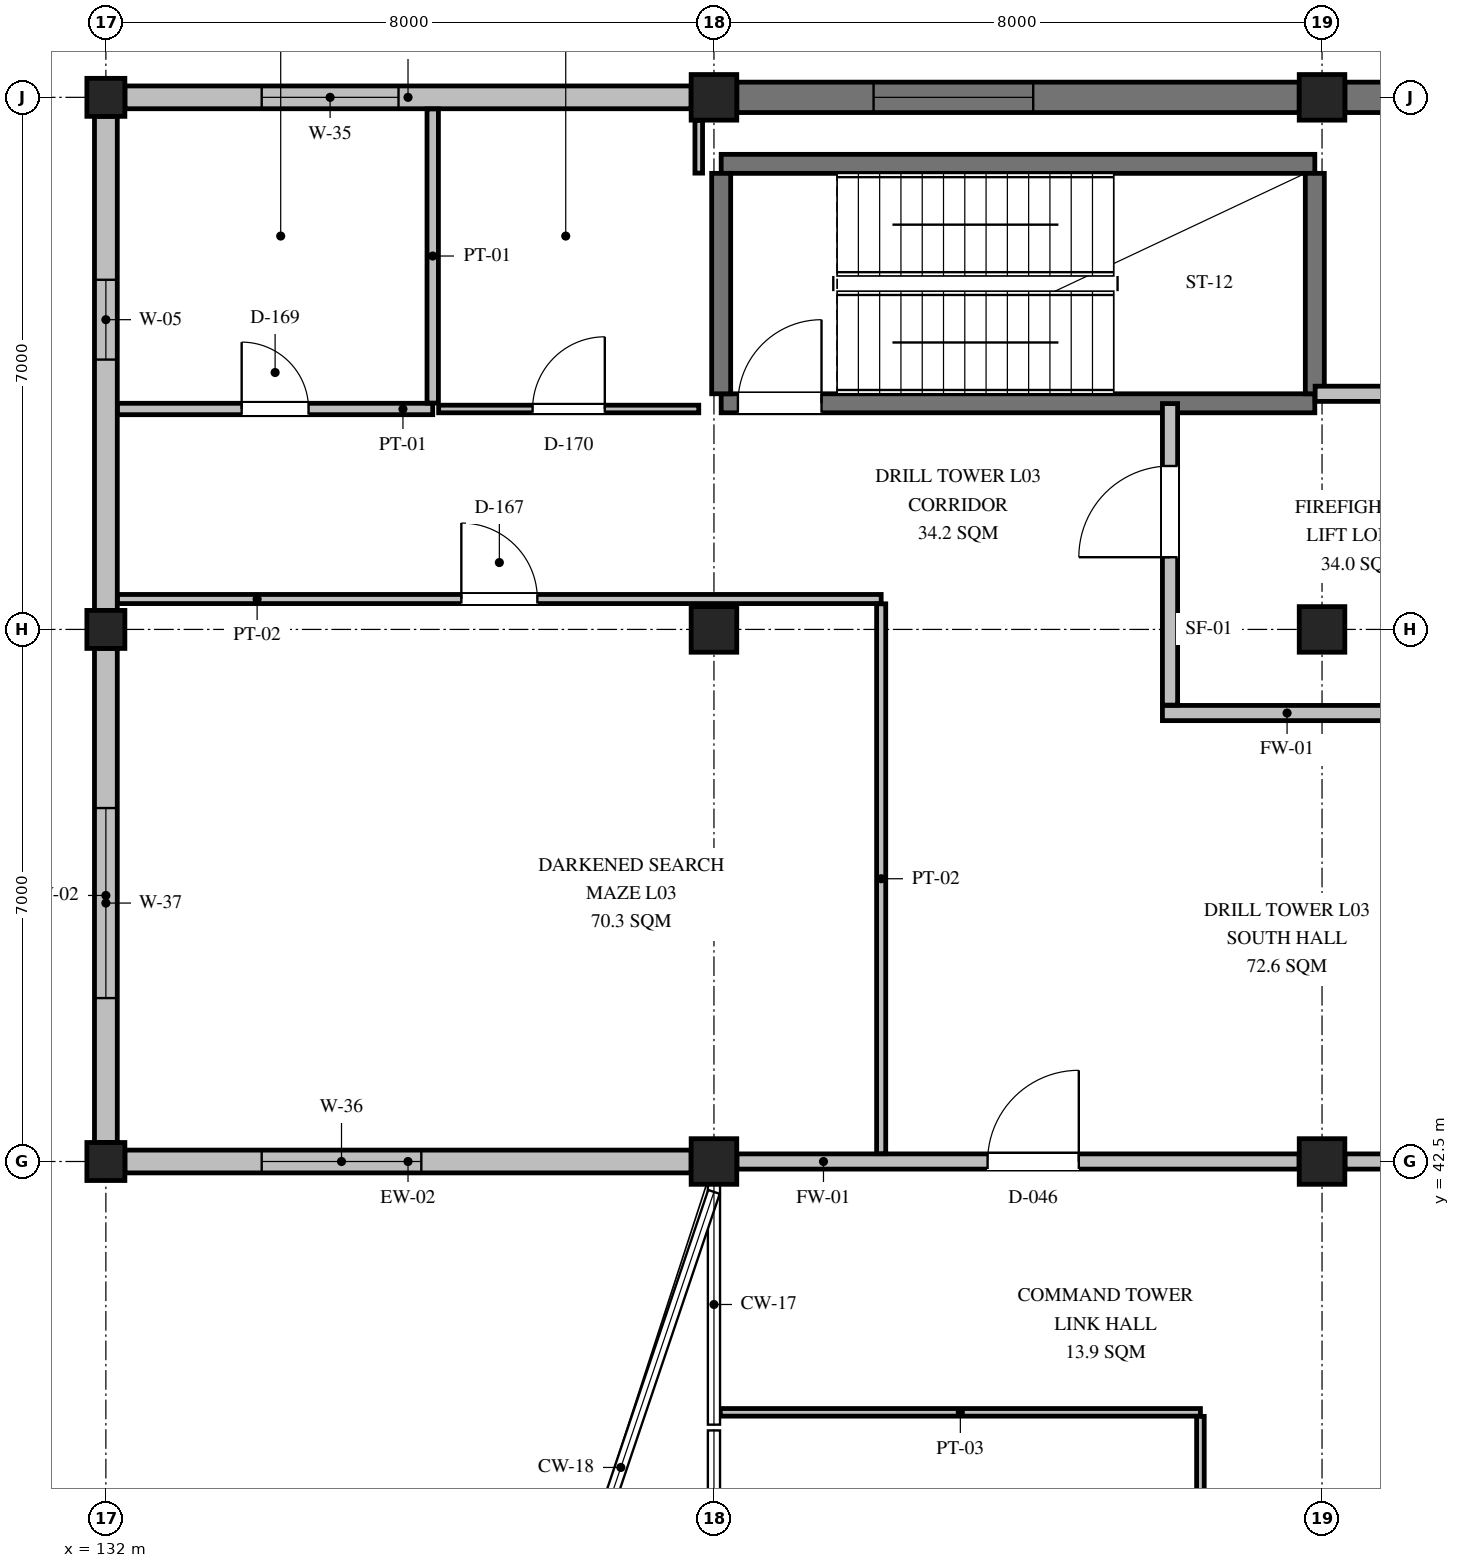
"""IFC4 building model, lengths in metres.
Left out: names, types, materials, properties, quantities, classifications, styles, units other than length and angle.
Written with IfcOpenShell. Run it as: python <this file> out.ifc"""

import sys

from ifc_helpers import new_model, si_unit, direction, frame, frame_2d, origin, origin_2d, place, context, subcontext, project, spatial, rectangle, extrude, element, fill, save


model = new_model("IFC4")
c1 = context("Model", 3, precision=1e-05, world=origin(), true_north=direction((0.0, 1.0)))
c2 = subcontext(c1, "Body", "Model", "MODEL_VIEW")
j1 = project(units=[si_unit("LENGTHUNIT", "METRE"), si_unit("PLANEANGLEUNIT", "RADIAN")], contexts=[c1])
p1 = place(None, origin())
s1 = spatial("IfcSite", under=j1, at=p1, CompositionType="ELEMENT")
p2 = place(p1, origin())
s2 = spatial("IfcBuilding", under=s1, at=p2, CompositionType="ELEMENT")
p3 = place(p2, frame((0.0, 0.0, 10.05)))
s3 = spatial("IfcBuildingStorey", under=s2, at=p3, CompositionType="ELEMENT", Elevation=10.05)
for number, where, z_axis, x_axis in (
    (1, (132.0, 42.5, 0.0), (0.0, 0.0, 1.0), (1.0, 0.0, 0.0)),
    (2, (132.0, 49.5, 0.0), (0.0, 0.0, 1.0), (1.0, 0.0, 0.0)),
    (3, (132.0, 56.5, 0.0), (0.0, 0.0, 1.0), (1.0, 0.0, 0.0)),
):
    element("IfcColumn", number, at=place(p3, frame(where, z_axis=z_axis, x_axis=x_axis)), inside=s3, PredefinedType="COLUMN", context=c2, shape_type="SweptSolid", body=[
        extrude(rectangle(XDim=0.5, YDim=0.5, at=origin_2d()), origin(), (0.0, 0.0, 1.0), 4.2),
    ])
for number, where, z_axis, x_axis in (
    (4, (140.0, 42.5, 0.0), (0.0, 0.0, 1.0), (1.0, 0.0, 0.0)),
    (5, (140.0, 49.5, 0.0), (0.0, 0.0, 1.0), (1.0, 0.0, 0.0)),
    (6, (140.0, 56.5, 0.0), (0.0, 0.0, 1.0), (1.0, 0.0, 0.0)),
    (7, (148.0, 42.5, 0.0), (0.0, 0.0, 1.0), (1.0, 0.0, 0.0)),
    (8, (148.0, 49.5, 0.0), (0.0, 0.0, 1.0), (1.0, 0.0, 0.0)),
    (9, (148.0, 56.5, 0.0), (0.0, 0.0, 1.0), (1.0, 0.0, 0.0)),
):
    element("IfcColumn", number, at=place(p3, frame(where, z_axis=z_axis, x_axis=x_axis)), inside=s3, PredefinedType="COLUMN", context=c2, shape_type="SweptSolid", body=[
        extrude(rectangle(XDim=0.6, YDim=0.6, at=origin_2d()), origin(), (0.0, 0.0, 1.0), 4.2),
    ])
p4 = place(p3, frame((132.25, 56.5, 0.0), z_axis=(0.0, 0.0, 1.0), x_axis=(1.0, 0.0, 0.0)))
e10 = element("IfcWall", 10, at=p4, inside=s3, PredefinedType="SOLIDWALL", context=c2, shape_type="SweptSolid", body=[
    extrude(rectangle(XDim=7.45, YDim=0.3, at=frame_2d((3.725, 0.0))), origin(), (0.0, 0.0, 1.0), 3.444),
])
p5 = place(p4, frame((1.8, 0.0, 0.9)))
e11 = element("IfcOpeningElement", 11, at=p5, cuts=e10, PredefinedType="OPENING", context=c2, shape_type="SweptSolid", body=[
    extrude(rectangle(XDim=1.8, YDim=2.1, at=frame_2d((0.9, 1.05))), frame((0.0, 0.16, 0.0), z_axis=(0.0, -1.0, 0.0), x_axis=(1.0, 0.0, 0.0)), (0.0, 0.0, 1.0), 0.32),
])
p6 = place(p3, frame((140.3, 56.5, 0.0), z_axis=(0.0, 0.0, 1.0), x_axis=(1.0, 0.0, 0.0)))
e12 = element("IfcWall", 12, at=p6, inside=s3, PredefinedType="SHEAR", context=c2, shape_type="SweptSolid", body=[
    extrude(rectangle(XDim=7.4, YDim=0.4, at=frame_2d((3.7, 0.0))), origin(), (0.0, 0.0, 1.0), 4.0),
])
p7 = place(p6, frame((1.8, 0.0, 0.9)))
e13 = element("IfcOpeningElement", 13, at=p7, cuts=e12, PredefinedType="OPENING", context=c2, shape_type="SweptSolid", body=[
    extrude(rectangle(XDim=2.1, YDim=2.1, at=frame_2d((1.05, 1.05))), frame((0.0, 0.21, 0.0), z_axis=(0.0, -1.0, 0.0), x_axis=(1.0, 0.0, 0.0)), (0.0, 0.0, 1.0), 0.42),
])
p8 = place(p3, frame((148.3, 56.5, 0.0), z_axis=(0.0, 0.0, 1.0), x_axis=(1.0, 0.0, 0.0)))
e14 = element("IfcWall", 14, at=p8, inside=s3, PredefinedType="SHEAR", context=c2, shape_type="SweptSolid", body=[
    extrude(rectangle(XDim=12.4, YDim=0.4, at=frame_2d((6.2, 0.0))), origin(), (0.0, 0.0, 1.0), 4.0),
])
p9 = place(p8, frame((1.8, 0.0, 0.9)))
e15 = element("IfcOpeningElement", 15, at=p9, cuts=e14, PredefinedType="OPENING", context=c2, shape_type="SweptSolid", body=[
    extrude(rectangle(XDim=2.5, YDim=2.1, at=frame_2d((1.25, 1.05))), frame((0.0, 0.21, 0.0), z_axis=(0.0, -1.0, 0.0), x_axis=(1.0, 0.0, 0.0)), (0.0, 0.0, 1.0), 0.42),
])
p10 = place(p3, frame((132.0, 42.75, 0.0), z_axis=(0.0, 0.0, 1.0), x_axis=(0.0, 1.0, 0.0)))
e16 = element("IfcWall", 16, at=p10, inside=s3, PredefinedType="SOLIDWALL", context=c2, shape_type="SweptSolid", body=[
    extrude(rectangle(XDim=6.5, YDim=0.3, at=frame_2d((3.25, 0.0))), origin(), (0.0, 0.0, 1.0), 3.494),
])
p11 = place(p10, frame((1.9, 0.0, 0.85)))
e17 = element("IfcOpeningElement", 17, at=p11, cuts=e16, PredefinedType="OPENING", context=c2, shape_type="SweptSolid", body=[
    extrude(rectangle(XDim=2.5, YDim=2.1, at=frame_2d((1.25, 1.05))), frame((0.0, 0.16, 0.0), z_axis=(0.0, -1.0, 0.0), x_axis=(1.0, 0.0, 0.0)), (0.0, 0.0, 1.0), 0.32),
])
p12 = place(p3, frame((132.0, 49.75, 0.0), z_axis=(0.0, 0.0, 1.0), x_axis=(0.0, 1.0, 0.0)))
e18 = element("IfcWall", 18, at=p12, inside=s3, PredefinedType="SOLIDWALL", context=c2, shape_type="SweptSolid", body=[
    extrude(rectangle(XDim=6.5, YDim=0.3, at=frame_2d((3.25, 0.0))), origin(), (0.0, 0.0, 1.0), 3.544),
])
p13 = place(p12, frame((3.3, 0.0, 1.05)))
e19 = element("IfcOpeningElement", 19, at=p13, cuts=e18, PredefinedType="OPENING", context=c2, shape_type="SweptSolid", body=[
    extrude(rectangle(XDim=1.05, YDim=1.05, at=frame_2d((0.525, 0.525))), frame((0.0, 0.16, 0.0), z_axis=(0.0, -1.0, 0.0), x_axis=(1.0, 0.0, 0.0)), (0.0, 0.0, 1.0), 0.32),
])
p14 = place(p3, frame((132.25, 42.5, 0.0), z_axis=(0.0, 0.0, 1.0), x_axis=(1.0, 0.0, 0.0)))
e20 = element("IfcWall", 20, at=p14, inside=s3, PredefinedType="SOLIDWALL", context=c2, shape_type="SweptSolid", body=[
    extrude(rectangle(XDim=7.45, YDim=0.3, at=frame_2d((3.725, 0.0))), origin(), (0.0, 0.0, 1.0), 3.544),
])
p15 = place(p14, frame((1.8, 0.0, 0.9)))
e21 = element("IfcOpeningElement", 21, at=p15, cuts=e20, PredefinedType="OPENING", context=c2, shape_type="SweptSolid", body=[
    extrude(rectangle(XDim=2.1, YDim=2.1, at=frame_2d((1.05, 1.05))), frame((0.0, 0.16, 0.0), z_axis=(0.0, -1.0, 0.0), x_axis=(1.0, 0.0, 0.0)), (0.0, 0.0, 1.0), 0.32),
])
p16 = place(p3, frame((140.095, 52.475, 0.0), z_axis=(0.0, 0.0, 1.0), x_axis=(1.0, 0.0, 0.0)))
e22 = element("IfcWall", 22, at=p16, inside=s3, PredefinedType="SHEAR", context=c2, shape_type="SweptSolid", body=[
    extrude(rectangle(XDim=7.81, YDim=0.25, at=frame_2d((3.905, 0.0))), origin(), (0.0, 0.0, 1.0), 4.0),
])
p17 = place(p16, frame((0.22, 0.0, 0.0)))
e23 = element("IfcOpeningElement", 23, at=p17, cuts=e22, PredefinedType="OPENING", context=c2, shape_type="SweptSolid", body=[
    extrude(rectangle(XDim=1.1, YDim=2.15, at=frame_2d((0.55, 1.075))), frame((0.0, 0.135, 0.0), z_axis=(0.0, -1.0, 0.0), x_axis=(1.0, 0.0, 0.0)), (0.0, 0.0, 1.0), 0.27),
])
p18 = place(p3, frame((140.095, 55.625, 0.0), z_axis=(0.0, 0.0, 1.0), x_axis=(1.0, 0.0, 0.0)))
e24 = element("IfcWall", 24, at=p18, inside=s3, PredefinedType="SHEAR", context=c2, shape_type="SweptSolid", body=[
    extrude(rectangle(XDim=7.81, YDim=0.25, at=frame_2d((3.905, 0.0))), origin(), (0.0, 0.0, 1.0), 4.0),
])
for number, where, z_axis, x_axis in (
    (25, (140.095, 52.6, 0.0), (0.0, 0.0, 1.0), (0.0, 1.0, 0.0)),
    (26, (147.905, 52.6, 0.0), (0.0, 0.0, 1.0), (0.0, 1.0, 0.0)),
):
    element("IfcWall", number, at=place(p3, frame(where, z_axis=z_axis, x_axis=x_axis)), inside=s3, PredefinedType="SHEAR", context=c2, shape_type="SweptSolid", body=[
        extrude(rectangle(XDim=2.9, YDim=0.25, at=frame_2d((1.45, 0.0))), origin(), (0.0, 0.0, 1.0), 4.0),
    ])
p19 = place(p3, frame((140.302, 42.5, 0.0), z_axis=(0.0, 0.0, 1.0), x_axis=(1.0, 0.0, 0.0)))
e27 = element("IfcWall", 27, at=p19, inside=s3, PredefinedType="PARTITIONING", context=c2, shape_type="SweptSolid", body=[
    extrude(rectangle(XDim=7.396, YDim=0.2, at=frame_2d((3.698, 0.0))), origin(), (0.0, 0.0, 1.0), 3.494),
])
p20 = place(p19, frame((3.298, 0.0, 0.0)))
e28 = element("IfcOpeningElement", 28, at=p20, cuts=e27, PredefinedType="OPENING", context=c2, shape_type="SweptSolid", body=[
    extrude(rectangle(XDim=1.2, YDim=2.15, at=frame_2d((0.6, 1.075))), frame((0.0, 0.11, 0.0), z_axis=(0.0, -1.0, 0.0), x_axis=(1.0, 0.0, 0.0)), (0.0, 0.0, 1.0), 0.22),
])
p21 = place(p3, frame((148.302, 42.5, 0.0), z_axis=(0.0, 0.0, 1.0), x_axis=(1.0, 0.0, 0.0)))
e29 = element("IfcWall", 29, at=p21, inside=s3, PredefinedType="PARTITIONING", context=c2, shape_type="SweptSolid", body=[
    extrude(rectangle(XDim=5.896, YDim=0.2, at=frame_2d((2.948, 0.0))), origin(), (0.0, 0.0, 1.0), 3.554),
])
p22 = place(p3, frame((147.909, 52.6, 0.0), z_axis=(0.0, 0.0, 1.0), x_axis=(1.0, 0.0, 0.0)))
e30 = element("IfcWall", 30, at=p22, inside=s3, PredefinedType="PARTITIONING", context=c2, shape_type="SweptSolid", body=[
    extrude(rectangle(XDim=1.362, YDim=0.2, at=frame_2d((0.681, 0.0))), origin(), (0.0, 0.0, 1.0), 4.0),
])
p23 = place(p3, frame((145.9, 48.4, 0.0), z_axis=(0.0, 0.0, 1.0), x_axis=(1.0, 0.0, 0.0)))
e31 = element("IfcWall", 31, at=p23, inside=s3, PredefinedType="PARTITIONING", context=c2, shape_type="SweptSolid", body=[
    extrude(rectangle(XDim=8.7, YDim=0.2, at=frame_2d((4.35, 0.0))), origin(), (0.0, 0.0, 1.0), 4.0),
])
p24 = place(p23, frame((4.3, 0.0, 0.0)))
e32 = element("IfcOpeningElement", 32, at=p24, cuts=e31, PredefinedType="OPENING", context=c2, shape_type="SweptSolid", body=[
    extrude(rectangle(XDim=1.2, YDim=2.15, at=frame_2d((0.6, 1.075))), frame((0.0, 0.11, 0.0), z_axis=(0.0, -1.0, 0.0), x_axis=(1.0, 0.0, 0.0)), (0.0, 0.0, 1.0), 0.22),
])
p25 = place(p3, frame((146.0, 48.504, 0.0), z_axis=(0.0, 0.0, 1.0), x_axis=(0.0, 1.0, 0.0)))
e33 = element("IfcWall", 33, at=p25, inside=s3, PredefinedType="PARTITIONING", context=c2, shape_type="SweptSolid", body=[
    extrude(rectangle(XDim=3.967, YDim=0.2, at=frame_2d((1.983, 0.0))), origin(), (0.0, 0.0, 1.0), 4.0),
])
p26 = place(p25, frame((1.946, 0.0, 0.0)))
e34 = element("IfcOpeningElement", 34, at=p26, cuts=e33, PredefinedType="OPENING", context=c2, shape_type="SweptSolid", body=[
    extrude(rectangle(XDim=1.2, YDim=2.15, at=frame_2d((0.6, 1.075))), frame((0.0, 0.11, 0.0), z_axis=(0.0, -1.0, 0.0), x_axis=(1.0, 0.0, 0.0)), (0.0, 0.0, 1.0), 0.22),
])
p27 = place(p3, frame((140.083, 39.2, 0.0), z_axis=(0.0, 0.0, 1.0), x_axis=(1.0, 0.0, 0.0)))
e35 = element("IfcWall", 35, at=p27, inside=s3, PredefinedType="PARTITIONING", context=c2, shape_type="SweptSolid", body=[
    extrude(rectangle(XDim=6.317, YDim=0.1, at=frame_2d((3.158, 0.0))), origin(), (0.0, 0.0, 1.0), 4.0),
])
p28 = place(p3, frame((146.4, 33.303, 0.0), z_axis=(0.0, 0.0, 1.0), x_axis=(0.0, 1.0, 0.0)))
e36 = element("IfcWall", 36, at=p28, inside=s3, PredefinedType="PARTITIONING", context=c2, shape_type="SweptSolid", body=[
    extrude(rectangle(XDim=5.844, YDim=0.1, at=frame_2d((2.922, 0.0))), origin(), (0.0, 0.0, 1.0), 3.7),
])
p29 = place(p28, frame((3.322, 0.0, 0.0)))
e37 = element("IfcOpeningElement", 37, at=p29, cuts=e36, PredefinedType="OPENING", context=c2, shape_type="SweptSolid", body=[
    extrude(rectangle(XDim=1.0, YDim=2.1, at=frame_2d((0.5, 1.05))), frame((0.0, 0.06, 0.0), z_axis=(0.0, -1.0, 0.0), x_axis=(1.0, 0.0, 0.0)), (0.0, 0.0, 1.0), 0.12),
])
p30 = place(p3, frame((132.153, 49.9, 0.0), z_axis=(0.0, 0.0, 1.0), x_axis=(1.0, 0.0, 0.0)))
e38 = element("IfcWall", 38, at=p30, inside=s3, PredefinedType="PARTITIONING", context=c2, shape_type="SweptSolid", body=[
    extrude(rectangle(XDim=10.047, YDim=0.12, at=frame_2d((5.023, 0.0))), origin(), (0.0, 0.0, 1.0), 4.0),
])
p31 = place(p30, frame((4.523, 0.0, 0.0)))
e39 = element("IfcOpeningElement", 39, at=p31, cuts=e38, PredefinedType="OPENING", context=c2, shape_type="SweptSolid", body=[
    extrude(rectangle(XDim=1.0, YDim=2.1, at=frame_2d((0.5, 1.05))), frame((0.0, 0.07, 0.0), z_axis=(0.0, -1.0, 0.0), x_axis=(1.0, 0.0, 0.0)), (0.0, 0.0, 1.0), 0.14),
])
p32 = place(p3, frame((142.2, 42.603, 0.0), z_axis=(0.0, 0.0, 1.0), x_axis=(0.0, 1.0, 0.0)))
e40 = element("IfcWall", 40, at=p32, inside=s3, PredefinedType="PARTITIONING", context=c2, shape_type="SweptSolid", body=[
    extrude(rectangle(XDim=7.234, YDim=0.12, at=frame_2d((3.617, 0.0))), origin(), (0.0, 0.0, 1.0), 4.0),
])
p33 = place(p3, frame((132.153, 52.4, 0.0), z_axis=(0.0, 0.0, 1.0), x_axis=(1.0, 0.0, 0.0)))
e41 = element("IfcWall", 41, at=p33, inside=s3, PredefinedType="PARTITIONING", context=c2, shape_type="SweptSolid", body=[
    extrude(rectangle(XDim=4.147, YDim=0.15, at=frame_2d((2.073, 0.0))), origin(), (0.0, 0.0, 1.0), 4.0),
])
p34 = place(p33, frame((1.634, 0.0, 0.0)))
e42 = element("IfcOpeningElement", 42, at=p34, cuts=e41, PredefinedType="OPENING", context=c2, shape_type="SweptSolid", body=[
    extrude(rectangle(XDim=0.88, YDim=2.1, at=frame_2d((0.44, 1.05))), frame((0.0, 0.085, 0.0), z_axis=(0.0, -1.0, 0.0), x_axis=(1.0, 0.0, 0.0)), (0.0, 0.0, 1.0), 0.17),
])
p35 = place(p3, frame((136.3, 52.478, 0.0), z_axis=(0.0, 0.0, 1.0), x_axis=(0.0, 1.0, 0.0)))
e43 = element("IfcWall", 43, at=p35, inside=s3, PredefinedType="PARTITIONING", context=c2, shape_type="SweptSolid", body=[
    extrude(rectangle(XDim=3.869, YDim=0.15, at=frame_2d((1.935, 0.0))), origin(), (0.0, 0.0, 1.0), 4.0),
])
p36 = place(p3, frame((136.378, 52.4, 0.0), z_axis=(0.0, 0.0, 1.0), x_axis=(1.0, 0.0, 0.0)))
e44 = element("IfcWall", 44, at=p36, inside=s3, PredefinedType="PARTITIONING", context=c2, shape_type="SweptSolid", body=[
    extrude(rectangle(XDim=3.422, YDim=0.1, at=frame_2d((1.711, 0.0))), origin(), (0.0, 0.0, 1.0), 4.0),
])
p37 = place(p36, frame((1.236, 0.0, 0.0)))
e45 = element("IfcOpeningElement", 45, at=p37, cuts=e44, PredefinedType="OPENING", context=c2, shape_type="SweptSolid", body=[
    extrude(rectangle(XDim=0.95, YDim=2.1, at=frame_2d((0.475, 1.05))), frame((0.0, 0.06, 0.0), z_axis=(0.0, -1.0, 0.0), x_axis=(1.0, 0.0, 0.0)), (0.0, 0.0, 1.0), 0.12),
])
p38 = place(p3, frame((139.8, 55.503, 0.0), z_axis=(0.0, 0.0, 1.0), x_axis=(0.0, 1.0, 0.0)))
e46 = element("IfcWall", 46, at=p38, inside=s3, PredefinedType="PARTITIONING", context=c2, shape_type="SweptSolid", body=[
    extrude(rectangle(XDim=0.694, YDim=0.1, at=frame_2d((0.347, 0.0))), origin(), (0.0, 0.0, 1.0), 4.0),
])
p39 = place(p5, origin())
e47 = element("IfcWindow", 47, at=p39, inside=s3, PartitioningType="SINGLE_PANEL", PredefinedType="WINDOW", context=c2, shape_type="SweptSolid", body=[
    extrude(rectangle(XDim=1.8, YDim=2.1, at=frame_2d((0.9, 1.05))), frame((0.0, 0.03, 0.0), z_axis=(0.0, -1.0, 0.0), x_axis=(1.0, 0.0, 0.0)), (0.0, 0.0, 1.0), 0.06),
])
fill(e11, e47)
p40 = place(p7, origin())
e48 = element("IfcWindow", 48, at=p40, inside=s3, PartitioningType="SINGLE_PANEL", PredefinedType="WINDOW", context=c2, shape_type="SweptSolid", body=[
    extrude(rectangle(XDim=2.1, YDim=2.1, at=frame_2d((1.05, 1.05))), frame((0.0, 0.03, 0.0), z_axis=(0.0, -1.0, 0.0), x_axis=(1.0, 0.0, 0.0)), (0.0, 0.0, 1.0), 0.06),
])
fill(e13, e48)
p41 = place(p11, origin())
e49 = element("IfcWindow", 49, at=p41, inside=s3, PartitioningType="SINGLE_PANEL", PredefinedType="WINDOW", context=c2, shape_type="SweptSolid", body=[
    extrude(rectangle(XDim=2.5, YDim=2.1, at=frame_2d((1.25, 1.05))), frame((0.0, 0.03, 0.0), z_axis=(0.0, -1.0, 0.0), x_axis=(1.0, 0.0, 0.0)), (0.0, 0.0, 1.0), 0.06),
])
fill(e17, e49)
p42 = place(p13, origin())
e50 = element("IfcWindow", 50, at=p42, inside=s3, PartitioningType="SINGLE_PANEL", PredefinedType="WINDOW", context=c2, shape_type="SweptSolid", body=[
    extrude(rectangle(XDim=1.05, YDim=1.05, at=frame_2d((0.525, 0.525))), frame((0.0, 0.03, 0.0), z_axis=(0.0, -1.0, 0.0), x_axis=(1.0, 0.0, 0.0)), (0.0, 0.0, 1.0), 0.06),
])
fill(e19, e50)
p43 = place(p15, origin())
e51 = element("IfcWindow", 51, at=p43, inside=s3, PartitioningType="SINGLE_PANEL", PredefinedType="WINDOW", context=c2, shape_type="SweptSolid", body=[
    extrude(rectangle(XDim=2.1, YDim=2.1, at=frame_2d((1.05, 1.05))), frame((0.0, 0.03, 0.0), z_axis=(0.0, -1.0, 0.0), x_axis=(1.0, 0.0, 0.0)), (0.0, 0.0, 1.0), 0.06),
])
fill(e21, e51)
p44 = place(p17, frame((1.1, 0.0, 0.0), z_axis=(0.0, 0.0, 1.0), x_axis=(-1.0, 0.0, 0.0)))
e52 = element("IfcDoor", 52, at=p44, inside=s3, OperationType="SINGLE_SWING_RIGHT", PredefinedType="DOOR", context=c2, shape_type="SweptSolid", body=[
    extrude(rectangle(XDim=1.1, YDim=2.15, at=frame_2d((0.55, 1.075))), frame((0.0, 0.025, 0.0), z_axis=(0.0, -1.0, 0.0), x_axis=(1.0, 0.0, 0.0)), (0.0, 0.0, 1.0), 0.05),
])
fill(e23, e52)
p45 = place(p20, origin())
e53 = element("IfcDoor", 53, at=p45, inside=s3, OperationType="SINGLE_SWING_RIGHT", PredefinedType="DOOR", context=c2, shape_type="SweptSolid", body=[
    extrude(rectangle(XDim=1.2, YDim=2.15, at=frame_2d((0.6, 1.075))), frame((0.0, 0.025, 0.0), z_axis=(0.0, -1.0, 0.0), x_axis=(1.0, 0.0, 0.0)), (0.0, 0.0, 1.0), 0.05),
])
fill(e28, e53)
p46 = place(p26, origin())
e54 = element("IfcDoor", 54, at=p46, inside=s3, OperationType="SINGLE_SWING_LEFT", PredefinedType="DOOR", context=c2, shape_type="SweptSolid", body=[
    extrude(rectangle(XDim=1.2, YDim=2.15, at=frame_2d((0.6, 1.075))), frame((0.0, 0.025, 0.0), z_axis=(0.0, -1.0, 0.0), x_axis=(1.0, 0.0, 0.0)), (0.0, 0.0, 1.0), 0.05),
])
fill(e34, e54)
p47 = place(p31, origin())
e55 = element("IfcDoor", 55, at=p47, inside=s3, OperationType="SINGLE_SWING_LEFT", PredefinedType="DOOR", context=c2, shape_type="SweptSolid", body=[
    extrude(rectangle(XDim=1.0, YDim=2.1, at=frame_2d((0.5, 1.05))), frame((0.0, 0.025, 0.0), z_axis=(0.0, -1.0, 0.0), x_axis=(1.0, 0.0, 0.0)), (0.0, 0.0, 1.0), 0.05),
])
fill(e39, e55)
p48 = place(p34, origin())
e56 = element("IfcDoor", 56, at=p48, inside=s3, OperationType="SINGLE_SWING_LEFT", PredefinedType="DOOR", context=c2, shape_type="SweptSolid", body=[
    extrude(rectangle(XDim=0.88, YDim=2.1, at=frame_2d((0.44, 1.05))), frame((0.0, 0.025, 0.0), z_axis=(0.0, -1.0, 0.0), x_axis=(1.0, 0.0, 0.0)), (0.0, 0.0, 1.0), 0.05),
])
fill(e42, e56)
p49 = place(p37, origin())
e57 = element("IfcDoor", 57, at=p49, inside=s3, OperationType="SINGLE_SWING_RIGHT", PredefinedType="DOOR", context=c2, shape_type="SweptSolid", body=[
    extrude(rectangle(XDim=0.95, YDim=2.1, at=frame_2d((0.475, 1.05))), frame((0.0, 0.025, 0.0), z_axis=(0.0, -1.0, 0.0), x_axis=(1.0, 0.0, 0.0)), (0.0, 0.0, 1.0), 0.05),
])
fill(e45, e57)
save(model, sys.argv[1])
